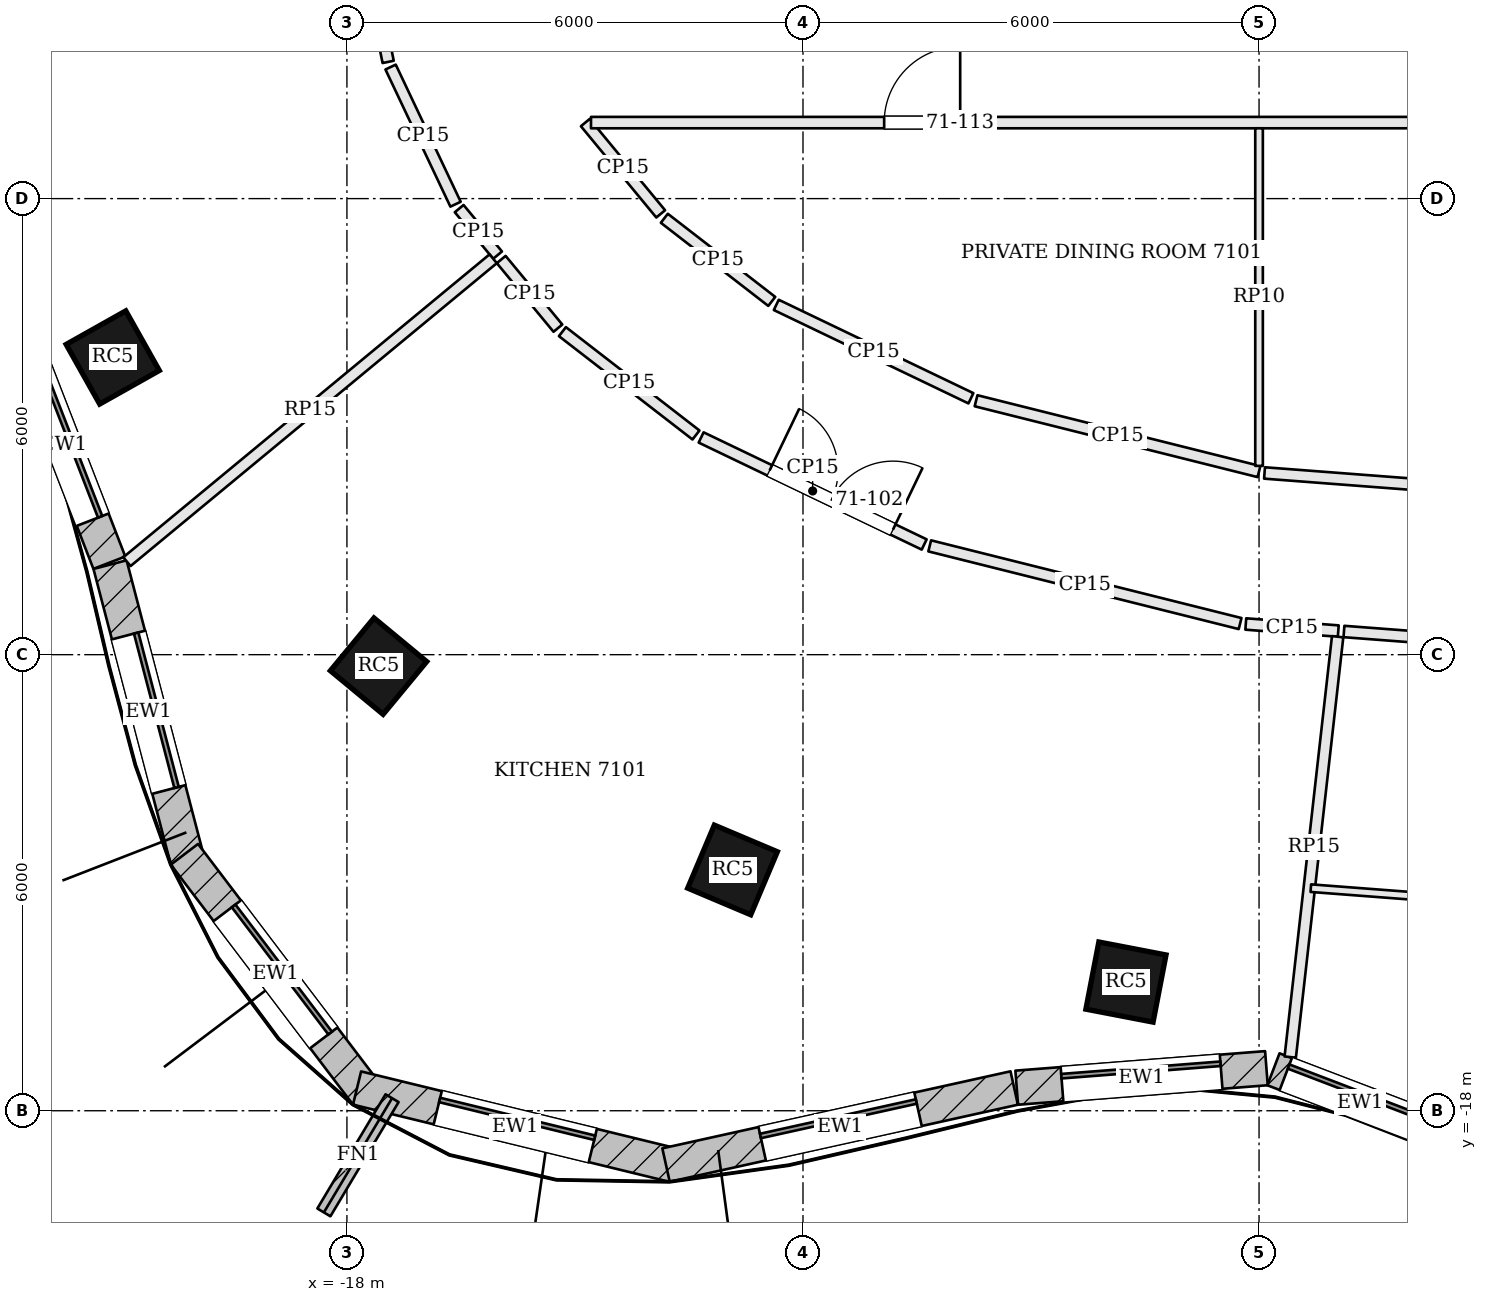
"""IFC4 building model, lengths in metres.
Left out: names, types, materials, properties, quantities, classifications, styles, units other than length and angle.
Written with IfcOpenShell. Run it as: python <this file> out.ifc"""

import sys

from ifc_helpers import new_model, si_unit, direction, frame, frame_2d, origin, origin_2d, place, context, subcontext, project, spatial, rectangle, extrude, element, fill, save


model = new_model("IFC4")
c1 = context("Model", 3, precision=1e-05, world=origin(), true_north=direction((0.0, 1.0)))
c2 = subcontext(c1, "Body", "Model", "MODEL_VIEW")
j1 = project(units=[si_unit("LENGTHUNIT", "METRE"), si_unit("PLANEANGLEUNIT", "RADIAN")], contexts=[c1])
p1 = place(None, origin())
s1 = spatial("IfcSite", under=j1, at=p1, CompositionType="ELEMENT")
p2 = place(p1, origin())
s2 = spatial("IfcBuilding", under=s1, at=p2, CompositionType="ELEMENT")
p3 = place(p2, frame((0.0, 0.0, 288.3)))
s3 = spatial("IfcBuildingStorey", under=s2, at=p3, CompositionType="ELEMENT", Elevation=288.3)
for number, where, z_axis, x_axis in (
    (1, (-21.081, -8.09, 0.0), (0.0, 0.0, 1.0), (0.49, -0.872, 0.0)),
    (2, (-17.584, -12.151, 0.0), (0.0, 0.0, 1.0), (0.771, -0.637, 0.0)),
    (3, (-12.927, -14.832, 0.0), (0.0, 0.0, 1.0), (0.921, -0.389, 0.0)),
    (4, (-7.751, -16.307, 0.0), (0.0, 0.0, 1.0), (0.982, -0.189, 0.0)),
):
    element("IfcColumn", number, at=place(p3, frame(where, z_axis=z_axis, x_axis=x_axis)), inside=s3, PredefinedType="COLUMN", context=c2, shape_type="SweptSolid", body=[
        extrude(rectangle(XDim=0.9, YDim=0.9, at=origin_2d()), origin(), (0.0, 0.0, 1.0), 3.9),
    ])
p4 = place(p3, frame((-22.323, -7.701, 0.0), z_axis=(0.0, 0.0, 1.0), x_axis=(0.361550075906, -0.932352692178, 0.0)))
e5 = element("IfcWall", 5, at=p4, inside=s3, PredefinedType="SOLIDWALL", context=c2, shape_type="SweptSolid", body=[
    extrude(rectangle(XDim=3.313, YDim=0.45, at=frame_2d((1.657, 0.0))), origin(), (0.0, 0.0, 1.0), 3.7),
])
p5 = place(p4, frame((0.607, 0.0, 0.9)))
e6 = element("IfcOpeningElement", 6, at=p5, cuts=e5, PredefinedType="OPENING", context=c2, shape_type="SweptSolid", body=[
    extrude(rectangle(XDim=2.1, YDim=2.3, at=frame_2d((1.05, 1.15))), frame((0.0, 0.235, 0.0), z_axis=(0.0, -1.0, 0.0), x_axis=(1.0, 0.0, 0.0)), (0.0, 0.0, 1.0), 0.47),
])
p6 = place(p3, frame((-21.117, -10.815, 0.0), z_axis=(0.0, 0.0, 1.0), x_axis=(0.253065392985, -0.967449175344, 0.0)))
e7 = element("IfcWall", 7, at=p6, inside=s3, PredefinedType="SOLIDWALL", context=c2, shape_type="SweptSolid", body=[
    extrude(rectangle(XDim=4.015, YDim=0.45, at=frame_2d((2.008, 0.0))), origin(), (0.0, 0.0, 1.0), 3.7),
])
p7 = place(p6, frame((0.958, 0.0, 0.9)))
e8 = element("IfcOpeningElement", 8, at=p7, cuts=e7, PredefinedType="OPENING", context=c2, shape_type="SweptSolid", body=[
    extrude(rectangle(XDim=2.1, YDim=2.3, at=frame_2d((1.05, 1.15))), frame((0.0, 0.235, 0.0), z_axis=(0.0, -1.0, 0.0), x_axis=(1.0, 0.0, 0.0)), (0.0, 0.0, 1.0), 0.47),
])
p8 = place(p3, frame((-20.138, -14.626, 0.0), z_axis=(0.0, 0.0, 1.0), x_axis=(0.604591324894, -0.796535830872, 0.0)))
e9 = element("IfcWall", 9, at=p8, inside=s3, PredefinedType="SOLIDWALL", context=c2, shape_type="SweptSolid", body=[
    extrude(rectangle(XDim=3.965, YDim=0.45, at=frame_2d((1.982, 0.0))), origin(), (0.0, 0.0, 1.0), 3.7),
])
p9 = place(p8, frame((0.932, 0.0, 0.9)))
e10 = element("IfcOpeningElement", 10, at=p9, cuts=e9, PredefinedType="OPENING", context=c2, shape_type="SweptSolid", body=[
    extrude(rectangle(XDim=2.1, YDim=2.3, at=frame_2d((1.05, 1.15))), frame((0.0, 0.235, 0.0), z_axis=(0.0, -1.0, 0.0), x_axis=(1.0, 0.0, 0.0)), (0.0, 0.0, 1.0), 0.47),
])
p10 = place(p3, frame((-17.867, -17.701, 0.0), z_axis=(0.0, 0.0, 1.0), x_axis=(0.971546885012, -0.236847314156, 0.0)))
e11 = element("IfcWall", 11, at=p10, inside=s3, PredefinedType="SOLIDWALL", context=c2, shape_type="SweptSolid", body=[
    extrude(rectangle(XDim=4.285, YDim=0.45, at=frame_2d((2.143, 0.0))), origin(), (0.0, 0.0, 1.0), 3.7),
])
p11 = place(p10, frame((1.093, 0.0, 0.9)))
e12 = element("IfcOpeningElement", 12, at=p11, cuts=e11, PredefinedType="OPENING", context=c2, shape_type="SweptSolid", body=[
    extrude(rectangle(XDim=2.1, YDim=2.3, at=frame_2d((1.05, 1.15))), frame((0.0, 0.235, 0.0), z_axis=(0.0, -1.0, 0.0), x_axis=(1.0, 0.0, 0.0)), (0.0, 0.0, 1.0), 0.47),
])
p12 = place(p3, frame((-13.802, -18.715, 0.0), z_axis=(0.0, 0.0, 1.0), x_axis=(0.976380129166, 0.216059814331, 0.0)))
e13 = element("IfcWall", 13, at=p12, inside=s3, PredefinedType="SOLIDWALL", context=c2, shape_type="SweptSolid", body=[
    extrude(rectangle(XDim=4.692, YDim=0.45, at=frame_2d((2.346, 0.0))), origin(), (0.0, 0.0, 1.0), 3.7),
])
p13 = place(p12, frame((1.296, 0.0, 0.9)))
e14 = element("IfcOpeningElement", 14, at=p13, cuts=e13, PredefinedType="OPENING", context=c2, shape_type="SweptSolid", body=[
    extrude(rectangle(XDim=2.1, YDim=2.3, at=frame_2d((1.05, 1.15))), frame((0.0, 0.235, 0.0), z_axis=(0.0, -1.0, 0.0), x_axis=(1.0, 0.0, 0.0)), (0.0, 0.0, 1.0), 0.47),
])
p14 = place(p3, frame((-9.188, -17.697, 0.0), z_axis=(0.0, 0.0, 1.0), x_axis=(0.996964028691, 0.077863505548, 0.0)))
e15 = element("IfcWall", 15, at=p14, inside=s3, PredefinedType="SOLIDWALL", context=c2, shape_type="SweptSolid", body=[
    extrude(rectangle(XDim=3.295, YDim=0.45, at=frame_2d((1.648, 0.0))), origin(), (0.0, 0.0, 1.0), 3.7),
])
p15 = place(p14, frame((0.598, 0.0, 0.9)))
e16 = element("IfcOpeningElement", 16, at=p15, cuts=e15, PredefinedType="OPENING", context=c2, shape_type="SweptSolid", body=[
    extrude(rectangle(XDim=2.1, YDim=2.3, at=frame_2d((1.05, 1.15))), frame((0.0, 0.235, 0.0), z_axis=(0.0, -1.0, 0.0), x_axis=(1.0, 0.0, 0.0)), (0.0, 0.0, 1.0), 0.47),
])
p16 = place(p3, frame((-5.811, -17.455, 0.0), z_axis=(0.0, 0.0, 1.0), x_axis=(0.934122271306, -0.35695319336, 0.0)))
e17 = element("IfcWall", 17, at=p16, inside=s3, PredefinedType="SOLIDWALL", context=c2, shape_type="SweptSolid", body=[
    extrude(rectangle(XDim=2.448, YDim=0.45, at=frame_2d((1.224, 0.0))), origin(), (0.0, 0.0, 1.0), 3.7),
])
p17 = place(p16, frame((0.174, 0.0, 0.9)))
e18 = element("IfcOpeningElement", 18, at=p17, cuts=e17, PredefinedType="OPENING", context=c2, shape_type="SweptSolid", body=[
    extrude(rectangle(XDim=2.1, YDim=2.3, at=frame_2d((1.05, 1.15))), frame((0.0, 0.235, 0.0), z_axis=(0.0, -1.0, 0.0), x_axis=(1.0, 0.0, 0.0)), (0.0, 0.0, 1.0), 0.47),
])
p18 = place(p3, frame((-17.406, -17.835, 0.0), z_axis=(0.0, 0.0, 1.0), x_axis=(-0.512648290506, -0.858598701514, 0.0)))
e19 = element("IfcWall", 19, at=p18, inside=s3, PredefinedType="SOLIDWALL", context=c2, shape_type="SweptSolid", body=[
    extrude(rectangle(XDim=1.75, YDim=0.2, at=frame_2d((0.875, 0.0))), origin(), (0.0, 0.0, 1.0), 3.7),
])
p19 = place(p3, frame((-17.906, -2.001, 0.0), z_axis=(0.0, 0.0, 1.0), x_axis=(0.199502025364, -0.979897413955, 0.0)))
e20 = element("IfcWall", 20, at=p19, inside=s3, PredefinedType="PARTITIONING", context=c2, shape_type="SweptSolid", body=[
    extrude(rectangle(XDim=2.246, YDim=0.15, at=frame_2d((1.123, 0.0))), origin(), (0.0, 0.0, 1.0), 3.198),
])
p20 = place(p3, frame((-17.425, -4.269, 0.0), z_axis=(0.0, 0.0, 1.0), x_axis=(0.427886578366, -0.90383243804, 0.0)))
e21 = element("IfcWall", 21, at=p20, inside=s3, PredefinedType="PARTITIONING", context=c2, shape_type="SweptSolid", body=[
    extrude(rectangle(XDim=1.996, YDim=0.15, at=frame_2d((0.998, 0.0))), origin(), (0.0, 0.0, 1.0), 3.198),
])
p21 = place(p3, frame((-16.523, -6.132, 0.0), z_axis=(0.0, 0.0, 1.0), x_axis=(0.636698606768, -0.771112757085, 0.0)))
e22 = element("IfcWall", 22, at=p21, inside=s3, PredefinedType="PARTITIONING", context=c2, shape_type="SweptSolid", body=[
    extrude(rectangle(XDim=0.794, YDim=0.15, at=frame_2d((0.397, 0.0))), origin(), (0.0, 0.0, 1.0), 3.198),
])
p22 = place(p3, frame((-20.894, -10.777, 0.0), z_axis=(0.0, 0.0, 1.0), x_axis=(0.770606553, 0.637311180251, 0.0)))
e23 = element("IfcWall", 23, at=p22, inside=s3, PredefinedType="PARTITIONING", context=c2, shape_type="SweptSolid", body=[
    extrude(rectangle(XDim=6.253, YDim=0.15, at=frame_2d((3.126, 0.0))), origin(), (0.0, 0.0, 1.0), 3.234),
])
p23 = place(p3, frame((-15.97, -6.802, 0.0), z_axis=(0.0, 0.0, 1.0), x_axis=(0.636897609689, -0.770948399552, 0.0)))
e24 = element("IfcWall", 24, at=p23, inside=s3, PredefinedType="PARTITIONING", context=c2, shape_type="SweptSolid", body=[
    extrude(rectangle(XDim=1.171, YDim=0.15, at=frame_2d((0.585, 0.0))), origin(), (0.0, 0.0, 1.0), 3.198),
])
p24 = place(p3, frame((-15.165, -7.75, 0.0), z_axis=(0.0, 0.0, 1.0), x_axis=(0.790917548929, -0.611922732701, 0.0)))
e25 = element("IfcWall", 25, at=p24, inside=s3, PredefinedType="PARTITIONING", context=c2, shape_type="SweptSolid", body=[
    extrude(rectangle(XDim=2.222, YDim=0.15, at=frame_2d((1.111, 0.0))), origin(), (0.0, 0.0, 1.0), 3.198),
])
p25 = place(p3, frame((-13.34, -9.142, 0.0), z_axis=(0.0, 0.0, 1.0), x_axis=(0.901599124721, -0.432572558425, 0.0)))
e26 = element("IfcWall", 26, at=p25, inside=s3, PredefinedType="PARTITIONING", context=c2, shape_type="SweptSolid", body=[
    extrude(rectangle(XDim=3.255, YDim=0.15, at=frame_2d((1.627, 0.0))), origin(), (0.0, 0.0, 1.0), 3.198),
])
p26 = place(p25, frame((1.0, 0.0, 0.0)))
e27 = element("IfcOpeningElement", 27, at=p26, cuts=e26, PredefinedType="OPENING", context=c2, shape_type="SweptSolid", body=[
    extrude(rectangle(XDim=1.8, YDim=2.1, at=frame_2d((0.9, 1.05))), frame((0.0, 0.085, 0.0), z_axis=(0.0, -1.0, 0.0), x_axis=(1.0, 0.0, 0.0)), (0.0, 0.0, 1.0), 0.17),
])
p27 = place(p3, frame((-10.333, -10.569, 0.0), z_axis=(0.0, 0.0, 1.0), x_axis=(0.970067398009, -0.242835836151, 0.0)))
e28 = element("IfcWall", 28, at=p27, inside=s3, PredefinedType="PARTITIONING", context=c2, shape_type="SweptSolid", body=[
    extrude(rectangle(XDim=4.209, YDim=0.15, at=frame_2d((2.105, 0.0))), origin(), (0.0, 0.0, 1.0), 3.198),
])
p28 = place(p3, frame((-6.175, -11.596, 0.0), z_axis=(0.0, 0.0, 1.0), x_axis=(0.997106038867, -0.076023333621, 0.0)))
e29 = element("IfcWall", 29, at=p28, inside=s3, PredefinedType="PARTITIONING", context=c2, shape_type="SweptSolid", body=[
    extrude(rectangle(XDim=1.22, YDim=0.15, at=frame_2d((0.61, 0.0))), origin(), (0.0, 0.0, 1.0), 3.198),
])
p29 = place(p3, frame((-5.59, -17.294, 0.0), z_axis=(0.0, 0.0, 1.0), x_axis=(0.112044411854, 0.993703200041, 0.0)))
e30 = element("IfcWall", 30, at=p29, inside=s3, PredefinedType="PARTITIONING", context=c2, shape_type="SweptSolid", body=[
    extrude(rectangle(XDim=5.565, YDim=0.15, at=frame_2d((2.783, 0.0))), origin(), (0.0, 0.0, 1.0), 3.234),
])
p30 = place(p3, frame((-4.883, -11.695, 0.0), z_axis=(0.0, 0.0, 1.0), x_axis=(0.997096936577, -0.076142623207, 0.0)))
e31 = element("IfcWall", 31, at=p30, inside=s3, PredefinedType="PARTITIONING", context=c2, shape_type="SweptSolid", body=[
    extrude(rectangle(XDim=3.944, YDim=0.15, at=frame_2d((1.972, 0.0))), origin(), (0.0, 0.0, 1.0), 3.198),
])
p31 = place(p30, frame((1.604, 0.0, 0.0)))
e32 = element("IfcOpeningElement", 32, at=p31, cuts=e31, PredefinedType="OPENING", context=c2, shape_type="SweptSolid", body=[
    extrude(rectangle(XDim=1.8, YDim=2.1, at=frame_2d((0.9, 1.05))), frame((0.0, 0.085, 0.0), z_axis=(0.0, -1.0, 0.0), x_axis=(1.0, 0.0, 0.0)), (0.0, 0.0, 1.0), 0.17),
])
p32 = place(p3, frame((-0.982, -9.987, 0.0), z_axis=(0.0, 0.0, 1.0), x_axis=(-0.997096607341, 0.07614693447, 0.0)))
e33 = element("IfcWall", 33, at=p32, inside=s3, PredefinedType="PARTITIONING", context=c2, shape_type="SweptSolid", body=[
    extrude(rectangle(XDim=4.96, YDim=0.15, at=frame_2d((2.48, 0.0))), origin(), (0.0, 0.0, 1.0), 3.198),
])
p33 = place(p3, frame((-6.001, -9.591, 0.0), z_axis=(0.0, 0.0, 1.0), x_axis=(-0.970063855769, 0.242849986061, 0.0)))
e34 = element("IfcWall", 34, at=p33, inside=s3, PredefinedType="PARTITIONING", context=c2, shape_type="SweptSolid", body=[
    extrude(rectangle(XDim=3.837, YDim=0.15, at=frame_2d((1.919, 0.0))), origin(), (0.0, 0.0, 1.0), 3.198),
])
p34 = place(p3, frame((-9.791, -8.627, 0.0), z_axis=(0.0, 0.0, 1.0), x_axis=(-0.901598165215, 0.432574558292, 0.0)))
e35 = element("IfcWall", 35, at=p34, inside=s3, PredefinedType="PARTITIONING", context=c2, shape_type="SweptSolid", body=[
    extrude(rectangle(XDim=2.84, YDim=0.15, at=frame_2d((1.42, 0.0))), origin(), (0.0, 0.0, 1.0), 3.198),
])
p35 = place(p3, frame((-12.411, -7.353, 0.0), z_axis=(0.0, 0.0, 1.0), x_axis=(-0.790894311556, 0.611952766109, 0.0)))
e36 = element("IfcWall", 36, at=p35, inside=s3, PredefinedType="PARTITIONING", context=c2, shape_type="SweptSolid", body=[
    extrude(rectangle(XDim=1.787, YDim=0.15, at=frame_2d((0.894, 0.0))), origin(), (0.0, 0.0, 1.0), 3.198),
])
p36 = place(p3, frame((-13.872, -6.201, 0.0), z_axis=(0.0, 0.0, 1.0), x_axis=(-0.636832838855, 0.771001903601, 0.0)))
e37 = element("IfcWall", 37, at=p36, inside=s3, PredefinedType="PARTITIONING", context=c2, shape_type="SweptSolid", body=[
    extrude(rectangle(XDim=1.558, YDim=0.15, at=frame_2d((0.779, 0.0))), origin(), (0.0, 0.0, 1.0), 3.198),
])
p37 = place(p3, frame((-14.789, -5.0, 0.0), z_axis=(0.0, 0.0, 1.0), x_axis=(1.0, 0.0, 0.0)))
e38 = element("IfcWall", 38, at=p37, inside=s3, PredefinedType="PARTITIONING", context=c2, shape_type="SweptSolid", body=[
    extrude(rectangle(XDim=29.562, YDim=0.15, at=frame_2d((14.781, 0.0))), origin(), (0.0, 0.0, 1.0), 3.198),
])
p38 = place(p37, frame((3.857, 0.0, 0.0)))
e39 = element("IfcOpeningElement", 39, at=p38, cuts=e38, PredefinedType="OPENING", context=c2, shape_type="SweptSolid", body=[
    extrude(rectangle(XDim=1.0, YDim=2.4, at=frame_2d((0.5, 1.2))), frame((0.0, 0.085, 0.0), z_axis=(0.0, -1.0, 0.0), x_axis=(1.0, 0.0, 0.0)), (0.0, 0.0, 1.0), 0.17),
])
p39 = place(p37, frame((14.289, 0.0, 0.0)))
e40 = element("IfcOpeningElement", 40, at=p39, cuts=e38, PredefinedType="OPENING", context=c2, shape_type="SweptSolid", body=[
    extrude(rectangle(XDim=1.0, YDim=2.1, at=frame_2d((0.5, 1.05))), frame((0.0, 0.085, 0.0), z_axis=(0.0, -1.0, 0.0), x_axis=(1.0, 0.0, 0.0)), (0.0, 0.0, 1.0), 0.17),
])
p40 = place(p37, frame((24.713, 0.0, 0.0)))
e41 = element("IfcOpeningElement", 41, at=p40, cuts=e38, PredefinedType="OPENING", context=c2, shape_type="SweptSolid", body=[
    extrude(rectangle(XDim=1.0, YDim=2.4, at=frame_2d((0.5, 1.2))), frame((0.0, 0.085, 0.0), z_axis=(0.0, -1.0, 0.0), x_axis=(1.0, 0.0, 0.0)), (0.0, 0.0, 1.0), 0.17),
])
p41 = place(p3, frame((-1.073, -15.396, 0.0), z_axis=(0.0, 0.0, 1.0), x_axis=(-0.997093140471, 0.076192317369, 0.0)))
e42 = element("IfcWall", 42, at=p41, inside=s3, PredefinedType="PARTITIONING", context=c2, shape_type="SweptSolid", body=[
    extrude(rectangle(XDim=4.259, YDim=0.1, at=frame_2d((2.129, 0.0))), origin(), (0.0, 0.0, 1.0), 3.198),
])
p42 = place(p3, frame((-6.0, -9.516, 0.0), z_axis=(0.0, 0.0, 1.0), x_axis=(0.0, 1.0, 0.0)))
e43 = element("IfcWall", 43, at=p42, inside=s3, PredefinedType="PARTITIONING", context=c2, shape_type="SweptSolid", body=[
    extrude(rectangle(XDim=4.441, YDim=0.1, at=frame_2d((2.221, 0.0))), origin(), (0.0, 0.0, 1.0), 3.198),
])
p43 = place(p5, origin())
e44 = element("IfcWindow", 44, at=p43, inside=s3, PartitioningType="SINGLE_PANEL", PredefinedType="WINDOW", context=c2, shape_type="SweptSolid", body=[
    extrude(rectangle(XDim=2.1, YDim=2.3, at=frame_2d((1.05, 1.15))), frame((0.0, 0.135, 0.0), z_axis=(0.0, -1.0, 0.0), x_axis=(1.0, 0.0, 0.0)), (0.0, 0.0, 1.0), 0.06),
])
fill(e6, e44)
p44 = place(p7, origin())
e45 = element("IfcWindow", 45, at=p44, inside=s3, PartitioningType="SINGLE_PANEL", PredefinedType="WINDOW", context=c2, shape_type="SweptSolid", body=[
    extrude(rectangle(XDim=2.1, YDim=2.3, at=frame_2d((1.05, 1.15))), frame((0.0, 0.135, 0.0), z_axis=(0.0, -1.0, 0.0), x_axis=(1.0, 0.0, 0.0)), (0.0, 0.0, 1.0), 0.06),
])
fill(e8, e45)
p45 = place(p9, origin())
e46 = element("IfcWindow", 46, at=p45, inside=s3, PartitioningType="SINGLE_PANEL", PredefinedType="WINDOW", context=c2, shape_type="SweptSolid", body=[
    extrude(rectangle(XDim=2.1, YDim=2.3, at=frame_2d((1.05, 1.15))), frame((0.0, 0.135, 0.0), z_axis=(0.0, -1.0, 0.0), x_axis=(1.0, 0.0, 0.0)), (0.0, 0.0, 1.0), 0.06),
])
fill(e10, e46)
p46 = place(p11, origin())
e47 = element("IfcWindow", 47, at=p46, inside=s3, PartitioningType="SINGLE_PANEL", PredefinedType="WINDOW", context=c2, shape_type="SweptSolid", body=[
    extrude(rectangle(XDim=2.1, YDim=2.3, at=frame_2d((1.05, 1.15))), frame((0.0, 0.135, 0.0), z_axis=(0.0, -1.0, 0.0), x_axis=(1.0, 0.0, 0.0)), (0.0, 0.0, 1.0), 0.06),
])
fill(e12, e47)
p47 = place(p13, origin())
e48 = element("IfcWindow", 48, at=p47, inside=s3, PartitioningType="SINGLE_PANEL", PredefinedType="WINDOW", context=c2, shape_type="SweptSolid", body=[
    extrude(rectangle(XDim=2.1, YDim=2.3, at=frame_2d((1.05, 1.15))), frame((0.0, 0.135, 0.0), z_axis=(0.0, -1.0, 0.0), x_axis=(1.0, 0.0, 0.0)), (0.0, 0.0, 1.0), 0.06),
])
fill(e14, e48)
p48 = place(p15, origin())
e49 = element("IfcWindow", 49, at=p48, inside=s3, PartitioningType="SINGLE_PANEL", PredefinedType="WINDOW", context=c2, shape_type="SweptSolid", body=[
    extrude(rectangle(XDim=2.1, YDim=2.3, at=frame_2d((1.05, 1.15))), frame((0.0, 0.135, 0.0), z_axis=(0.0, -1.0, 0.0), x_axis=(1.0, 0.0, 0.0)), (0.0, 0.0, 1.0), 0.06),
])
fill(e16, e49)
p49 = place(p17, origin())
e50 = element("IfcWindow", 50, at=p49, inside=s3, PartitioningType="SINGLE_PANEL", PredefinedType="WINDOW", context=c2, shape_type="SweptSolid", body=[
    extrude(rectangle(XDim=2.1, YDim=2.3, at=frame_2d((1.05, 1.15))), frame((0.0, 0.135, 0.0), z_axis=(0.0, -1.0, 0.0), x_axis=(1.0, 0.0, 0.0)), (0.0, 0.0, 1.0), 0.06),
])
fill(e18, e50)
p50 = place(p26, origin())
e51 = element("IfcDoor", 51, at=p50, inside=s3, OperationType="DOUBLE_DOOR_SINGLE_SWING", PredefinedType="DOOR", context=c2, shape_type="SweptSolid", body=[
    extrude(rectangle(XDim=1.8, YDim=2.1, at=frame_2d((0.9, 1.05))), frame((0.0, 0.025, 0.0), z_axis=(0.0, -1.0, 0.0), x_axis=(1.0, 0.0, 0.0)), (0.0, 0.0, 1.0), 0.05),
])
fill(e27, e51)
p51 = place(p38, origin())
e52 = element("IfcDoor", 52, at=p51, inside=s3, OperationType="SINGLE_SWING_RIGHT", PredefinedType="DOOR", context=c2, shape_type="SweptSolid", body=[
    extrude(rectangle(XDim=1.0, YDim=2.4, at=frame_2d((0.5, 1.2))), frame((0.0, 0.025, 0.0), z_axis=(0.0, -1.0, 0.0), x_axis=(1.0, 0.0, 0.0)), (0.0, 0.0, 1.0), 0.05),
])
fill(e39, e52)
save(model, sys.argv[1])
